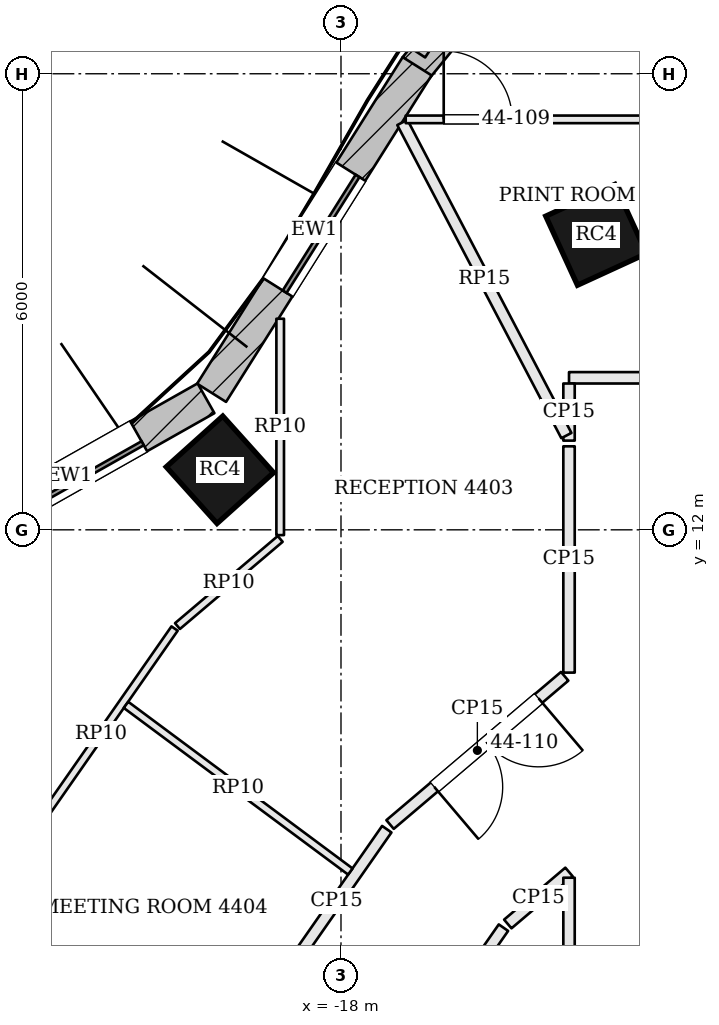
"""IFC4 building model, lengths in metres.
Left out: names, types, materials, properties, quantities, classifications, styles, units other than length and angle.
Written with IfcOpenShell. Run it as: python <this file> out.ifc"""

import sys

from ifc_helpers import new_model, si_unit, direction, frame, frame_2d, origin, origin_2d, place, context, subcontext, project, spatial, rectangle, extrude, element, fill, save


model = new_model("IFC4")
c1 = context("Model", 3, precision=1e-05, world=origin(), true_north=direction((0.0, 1.0)))
c2 = subcontext(c1, "Body", "Model", "MODEL_VIEW")
j1 = project(units=[si_unit("LENGTHUNIT", "METRE"), si_unit("PLANEANGLEUNIT", "RADIAN")], contexts=[c1])
p1 = place(None, origin())
s1 = spatial("IfcSite", under=j1, at=p1, CompositionType="ELEMENT")
p2 = place(p1, origin())
s2 = spatial("IfcBuilding", under=s1, at=p2, CompositionType="ELEMENT")
p3 = place(p2, frame((0.0, 0.0, 181.8)))
s3 = spatial("IfcBuildingStorey", under=s2, at=p3, CompositionType="ELEMENT", Elevation=181.8)
for number, where, z_axis, x_axis in (
    (1, (-14.643, 15.881, 0.0), (0.0, 0.0, 1.0), (-0.909, -0.417, 0.0)),
    (2, (-19.593, 12.79, 0.0), (0.0, 0.0, 1.0), (-0.744, -0.668, 0.0)),
):
    element("IfcColumn", number, at=place(p3, frame(where, z_axis=z_axis, x_axis=x_axis)), inside=s3, PredefinedType="COLUMN", context=c2, shape_type="SweptSolid", body=[
        extrude(rectangle(XDim=1.0, YDim=1.0, at=origin_2d()), origin(), (0.0, 0.0, 1.0), 3.9),
    ])
p4 = place(p3, frame((-14.926, 20.641, 0.0), z_axis=(0.0, 0.0, 1.0), x_axis=(-0.631548074669, -0.775336720001, 0.0)))
e3 = element("IfcWall", 3, at=p4, inside=s3, PredefinedType="SOLIDWALL", context=c2, shape_type="SweptSolid", body=[
    extrude(rectangle(XDim=3.308, YDim=0.45, at=frame_2d((1.654, 0.0))), origin(), (0.0, 0.0, 1.0), 3.7),
])
p5 = place(p4, frame((0.604, 0.0, 0.9)))
e4 = element("IfcOpeningElement", 4, at=p5, cuts=e3, PredefinedType="OPENING", context=c2, shape_type="SweptSolid", body=[
    extrude(rectangle(XDim=2.1, YDim=2.3, at=frame_2d((1.05, 1.15))), frame((0.0, 0.235, 0.0), z_axis=(0.0, -1.0, 0.0), x_axis=(1.0, 0.0, 0.0)), (0.0, 0.0, 1.0), 0.47),
])
p6 = place(p3, frame((-16.998, 18.099, 0.0), z_axis=(0.0, 0.0, 1.0), x_axis=(-0.532745661304, -0.846275404559, 0.0)))
e5 = element("IfcWall", 5, at=p6, inside=s3, PredefinedType="SOLIDWALL", context=c2, shape_type="SweptSolid", body=[
    extrude(rectangle(XDim=5.076, YDim=0.45, at=frame_2d((2.538, 0.0))), origin(), (0.0, 0.0, 1.0), 3.7),
])
p7 = place(p6, frame((1.638, 0.0, 0.9)))
e6 = element("IfcOpeningElement", 6, at=p7, cuts=e5, PredefinedType="OPENING", context=c2, shape_type="SweptSolid", body=[
    extrude(rectangle(XDim=1.8, YDim=2.3, at=frame_2d((0.9, 1.15))), frame((0.0, 0.235, 0.0), z_axis=(0.0, -1.0, 0.0), x_axis=(1.0, 0.0, 0.0)), (0.0, 0.0, 1.0), 0.47),
])
p8 = place(p3, frame((-19.776, 13.731, 0.0), z_axis=(0.0, 0.0, 1.0), x_axis=(-0.870610133829, -0.491973571318, 0.0)))
e7 = element("IfcWall", 7, at=p8, inside=s3, PredefinedType="SOLIDWALL", context=c2, shape_type="SweptSolid", body=[
    extrude(rectangle(XDim=4.134, YDim=0.45, at=frame_2d((2.067, 0.0))), origin(), (0.0, 0.0, 1.0), 3.7),
])
p9 = place(p8, frame((1.017, 0.0, 0.9)))
e8 = element("IfcOpeningElement", 8, at=p9, cuts=e7, PredefinedType="OPENING", context=c2, shape_type="SweptSolid", body=[
    extrude(rectangle(XDim=2.1, YDim=2.3, at=frame_2d((1.05, 1.15))), frame((0.0, 0.235, 0.0), z_axis=(0.0, -1.0, 0.0), x_axis=(1.0, 0.0, 0.0)), (0.0, 0.0, 1.0), 0.47),
])
p10 = place(p3, frame((-16.838, 18.298, 0.0), z_axis=(0.0, 0.0, 1.0), x_axis=(-0.835871900419, 0.548924554097, 0.0)))
e9 = element("IfcWall", 9, at=p10, inside=s3, PredefinedType="SOLIDWALL", context=c2, shape_type="SweptSolid", body=[
    extrude(rectangle(XDim=1.75, YDim=0.2, at=frame_2d((0.875, 0.0))), origin(), (0.0, 0.0, 1.0), 3.7),
])
p11 = place(p3, frame((0.125, 14.0, 0.0), z_axis=(0.0, 0.0, 1.0), x_axis=(-1.0, 0.0, 0.0)))
e10 = element("IfcWall", 10, at=p11, inside=s3, PredefinedType="PARTITIONING", context=c2, shape_type="SweptSolid", body=[
    extrude(rectangle(XDim=15.125, YDim=0.15, at=frame_2d((7.562, 0.0))), origin(), (0.0, 0.0, 1.0), 3.084),
])
p12 = place(p11, frame((0.888, 0.0, 0.0)))
e11 = element("IfcOpeningElement", 11, at=p12, cuts=e10, PredefinedType="OPENING", context=c2, shape_type="SweptSolid", body=[
    extrude(rectangle(XDim=1.0, YDim=2.1, at=frame_2d((0.5, 1.05))), frame((0.0, 0.085, 0.0), z_axis=(0.0, -1.0, 0.0), x_axis=(1.0, 0.0, 0.0)), (0.0, 0.0, 1.0), 0.17),
])
p13 = place(p11, frame((4.005, 0.0, 0.0)))
e12 = element("IfcOpeningElement", 12, at=p13, cuts=e10, PredefinedType="OPENING", context=c2, shape_type="SweptSolid", body=[
    extrude(rectangle(XDim=1.0, YDim=2.4, at=frame_2d((0.5, 1.2))), frame((0.0, 0.085, 0.0), z_axis=(0.0, -1.0, 0.0), x_axis=(1.0, 0.0, 0.0)), (0.0, 0.0, 1.0), 0.17),
])
p14 = place(p11, frame((7.307, 0.0, 0.0)))
e13 = element("IfcOpeningElement", 13, at=p14, cuts=e10, PredefinedType="OPENING", context=c2, shape_type="SweptSolid", body=[
    extrude(rectangle(XDim=1.0, YDim=2.4, at=frame_2d((0.5, 1.2))), frame((0.0, 0.085, 0.0), z_axis=(0.0, -1.0, 0.0), x_axis=(1.0, 0.0, 0.0)), (0.0, 0.0, 1.0), 0.17),
])
p15 = place(p3, frame((-15.0, 13.925, 0.0), z_axis=(0.0, 0.0, 1.0), x_axis=(0.0, -1.0, 0.0)))
e14 = element("IfcWall", 14, at=p15, inside=s3, PredefinedType="PARTITIONING", context=c2, shape_type="SweptSolid", body=[
    extrude(rectangle(XDim=0.751, YDim=0.15, at=frame_2d((0.376, 0.0))), origin(), (0.0, 0.0, 1.0), 3.084),
])
p16 = place(p3, frame((-17.193, 17.36, 0.0), z_axis=(0.0, 0.0, 1.0), x_axis=(0.463995225493, -0.885837699988, 0.0)))
e15 = element("IfcWall", 15, at=p16, inside=s3, PredefinedType="PARTITIONING", context=c2, shape_type="SweptSolid", body=[
    extrude(rectangle(XDim=4.651, YDim=0.15, at=frame_2d((2.325, 0.0))), origin(), (0.0, 0.0, 1.0), 3.234),
])
p17 = place(p3, frame((-15.0, 13.099, 0.0), z_axis=(0.0, 0.0, 1.0), x_axis=(0.0, -1.0, 0.0)))
e16 = element("IfcWall", 16, at=p17, inside=s3, PredefinedType="PARTITIONING", context=c2, shape_type="SweptSolid", body=[
    extrude(rectangle(XDim=2.977, YDim=0.15, at=frame_2d((1.489, 0.0))), origin(), (0.0, 0.0, 1.0), 3.084),
])
p18 = place(p3, frame((-15.057, 10.073, 0.0), z_axis=(0.0, 0.0, 1.0), x_axis=(-0.762398905861, -0.647107339119, 0.0)))
e17 = element("IfcWall", 17, at=p18, inside=s3, PredefinedType="PARTITIONING", context=c2, shape_type="SweptSolid", body=[
    extrude(rectangle(XDim=3.013, YDim=0.15, at=frame_2d((1.507, 0.0))), origin(), (0.0, 0.0, 1.0), 3.084),
])
p19 = place(p18, frame((0.45, 0.0, 0.0)))
e18 = element("IfcOpeningElement", 18, at=p19, cuts=e17, PredefinedType="OPENING", context=c2, shape_type="SweptSolid", body=[
    extrude(rectangle(XDim=1.8, YDim=2.1, at=frame_2d((0.9, 1.05))), frame((0.0, 0.085, 0.0), z_axis=(0.0, -1.0, 0.0), x_axis=(1.0, 0.0, 0.0)), (0.0, 0.0, 1.0), 0.17),
])
p20 = place(p3, frame((-17.397, 8.062, 0.0), z_axis=(0.0, 0.0, 1.0), x_axis=(-0.572118665737, -0.820170855563, 0.0)))
e19 = element("IfcWall", 19, at=p20, inside=s3, PredefinedType="PARTITIONING", context=c2, shape_type="SweptSolid", body=[
    extrude(rectangle(XDim=2.306, YDim=0.15, at=frame_2d((1.153, 0.0))), origin(), (0.0, 0.0, 1.0), 3.084),
])
p21 = place(p3, frame((-16.865, 5.329, 0.0), z_axis=(0.0, 0.0, 1.0), x_axis=(0.572096615639, 0.820186236397, 0.0)))
e20 = element("IfcWall", 20, at=p21, inside=s3, PredefinedType="PARTITIONING", context=c2, shape_type="SweptSolid", body=[
    extrude(rectangle(XDim=1.753, YDim=0.15, at=frame_2d((0.876, 0.0))), origin(), (0.0, 0.0, 1.0), 3.084),
])
p22 = place(p3, frame((-15.805, 6.814, 0.0), z_axis=(0.0, 0.0, 1.0), x_axis=(0.762298381233, 0.647225755027, 0.0)))
e21 = element("IfcWall", 21, at=p22, inside=s3, PredefinedType="PARTITIONING", context=c2, shape_type="SweptSolid", body=[
    extrude(rectangle(XDim=1.057, YDim=0.15, at=frame_2d((0.528, 0.0))), origin(), (0.0, 0.0, 1.0), 3.084),
])
p23 = place(p3, frame((-15.0, 7.423, 0.0), z_axis=(0.0, 0.0, 1.0), x_axis=(0.0, -1.0, 0.0)))
e22 = element("IfcWall", 22, at=p23, inside=s3, PredefinedType="PARTITIONING", context=c2, shape_type="SweptSolid", body=[
    extrude(rectangle(XDim=12.423, YDim=0.15, at=frame_2d((6.211, 0.0))), origin(), (0.0, 0.0, 1.0), 3.084),
])
p24 = place(p23, frame((5.174, 0.0, 0.0)))
e23 = element("IfcOpeningElement", 23, at=p24, cuts=e22, PredefinedType="OPENING", context=c2, shape_type="SweptSolid", body=[
    extrude(rectangle(XDim=1.0, YDim=2.1, at=frame_2d((0.5, 1.05))), frame((0.0, 0.085, 0.0), z_axis=(0.0, -1.0, 0.0), x_axis=(1.0, 0.0, 0.0)), (0.0, 0.0, 1.0), 0.17),
])
p25 = place(p3, frame((-17.149, 17.4, 0.0), z_axis=(0.0, 0.0, 1.0), x_axis=(1.0, 0.0, 0.0)))
e24 = element("IfcWall", 24, at=p25, inside=s3, PredefinedType="PARTITIONING", context=c2, shape_type="SweptSolid", body=[
    extrude(rectangle(XDim=7.602, YDim=0.1, at=frame_2d((3.801, 0.0))), origin(), (0.0, 0.0, 1.0), 3.084),
])
p26 = place(p25, frame((4.643, 0.0, 0.0)))
e25 = element("IfcOpeningElement", 25, at=p26, cuts=e24, PredefinedType="OPENING", context=c2, shape_type="SweptSolid", body=[
    extrude(rectangle(XDim=0.9, YDim=2.1, at=frame_2d((0.45, 1.05))), frame((0.0, 0.06, 0.0), z_axis=(0.0, -1.0, 0.0), x_axis=(1.0, 0.0, 0.0)), (0.0, 0.0, 1.0), 0.12),
])
p27 = place(p25, frame((0.5, 0.0, 0.0)))
e26 = element("IfcOpeningElement", 26, at=p27, cuts=e24, PredefinedType="OPENING", context=c2, shape_type="SweptSolid", body=[
    extrude(rectangle(XDim=0.9, YDim=2.1, at=frame_2d((0.45, 1.05))), frame((0.0, 0.06, 0.0), z_axis=(0.0, -1.0, 0.0), x_axis=(1.0, 0.0, 0.0)), (0.0, 0.0, 1.0), 0.12),
])
p28 = place(p3, frame((-22.125, 7.927, 0.0), z_axis=(0.0, 0.0, 1.0), x_axis=(0.572100301866, 0.820183665166, 0.0)))
e27 = element("IfcWall", 27, at=p28, inside=s3, PredefinedType="PARTITIONING", context=c2, shape_type="SweptSolid", body=[
    extrude(rectangle(XDim=3.382, YDim=0.1, at=frame_2d((1.691, 0.0))), origin(), (0.0, 0.0, 1.0), 3.084),
])
p29 = place(p3, frame((-20.151, 10.734, 0.0), z_axis=(0.0, 0.0, 1.0), x_axis=(0.762465888028, 0.647028414827, 0.0)))
e28 = element("IfcWall", 28, at=p29, inside=s3, PredefinedType="PARTITIONING", context=c2, shape_type="SweptSolid", body=[
    extrude(rectangle(XDim=1.772, YDim=0.1, at=frame_2d((0.886, 0.0))), origin(), (0.0, 0.0, 1.0), 3.084),
])
p30 = place(p3, frame((-18.8, 11.93, 0.0), z_axis=(0.0, 0.0, 1.0), x_axis=(0.0, 1.0, 0.0)))
e29 = element("IfcWall", 29, at=p30, inside=s3, PredefinedType="PARTITIONING", context=c2, shape_type="SweptSolid", body=[
    extrude(rectangle(XDim=2.846, YDim=0.1, at=frame_2d((1.423, 0.0))), origin(), (0.0, 0.0, 1.0), 3.084),
])
p31 = place(p3, frame((-17.877, 7.505, 0.0), z_axis=(0.0, 0.0, 1.0), x_axis=(-0.802692989486, 0.596392458563, 0.0)))
e30 = element("IfcWall", 30, at=p31, inside=s3, PredefinedType="PARTITIONING", context=c2, shape_type="SweptSolid", body=[
    extrude(rectangle(XDim=3.677, YDim=0.1, at=frame_2d((1.838, 0.0))), origin(), (0.0, 0.0, 1.0), 3.084),
])
p32 = place(p7, origin())
e31 = element("IfcWindow", 31, at=p32, inside=s3, PartitioningType="SINGLE_PANEL", PredefinedType="WINDOW", context=c2, shape_type="SweptSolid", body=[
    extrude(rectangle(XDim=1.8, YDim=2.3, at=frame_2d((0.9, 1.15))), frame((0.0, 0.135, 0.0), z_axis=(0.0, -1.0, 0.0), x_axis=(1.0, 0.0, 0.0)), (0.0, 0.0, 1.0), 0.06),
])
fill(e6, e31)
p33 = place(p9, origin())
e32 = element("IfcWindow", 32, at=p33, inside=s3, PartitioningType="SINGLE_PANEL", PredefinedType="WINDOW", context=c2, shape_type="SweptSolid", body=[
    extrude(rectangle(XDim=2.1, YDim=2.3, at=frame_2d((1.05, 1.15))), frame((0.0, 0.135, 0.0), z_axis=(0.0, -1.0, 0.0), x_axis=(1.0, 0.0, 0.0)), (0.0, 0.0, 1.0), 0.06),
])
fill(e8, e32)
p34 = place(p27, origin())
e33 = element("IfcDoor", 33, at=p34, inside=s3, OperationType="SINGLE_SWING_LEFT", PredefinedType="DOOR", context=c2, shape_type="SweptSolid", body=[
    extrude(rectangle(XDim=0.9, YDim=2.1, at=frame_2d((0.45, 1.05))), frame((0.0, 0.025, 0.0), z_axis=(0.0, -1.0, 0.0), x_axis=(1.0, 0.0, 0.0)), (0.0, 0.0, 1.0), 0.05),
])
fill(e26, e33)
p35 = place(p19, origin())
e34 = element("IfcDoor", 34, at=p35, inside=s3, OperationType="DOUBLE_DOOR_SINGLE_SWING", PredefinedType="DOOR", context=c2, shape_type="SweptSolid", body=[
    extrude(rectangle(XDim=1.8, YDim=2.1, at=frame_2d((0.9, 1.05))), frame((0.0, 0.025, 0.0), z_axis=(0.0, -1.0, 0.0), x_axis=(1.0, 0.0, 0.0)), (0.0, 0.0, 1.0), 0.05),
])
fill(e18, e34)
save(model, sys.argv[1])
